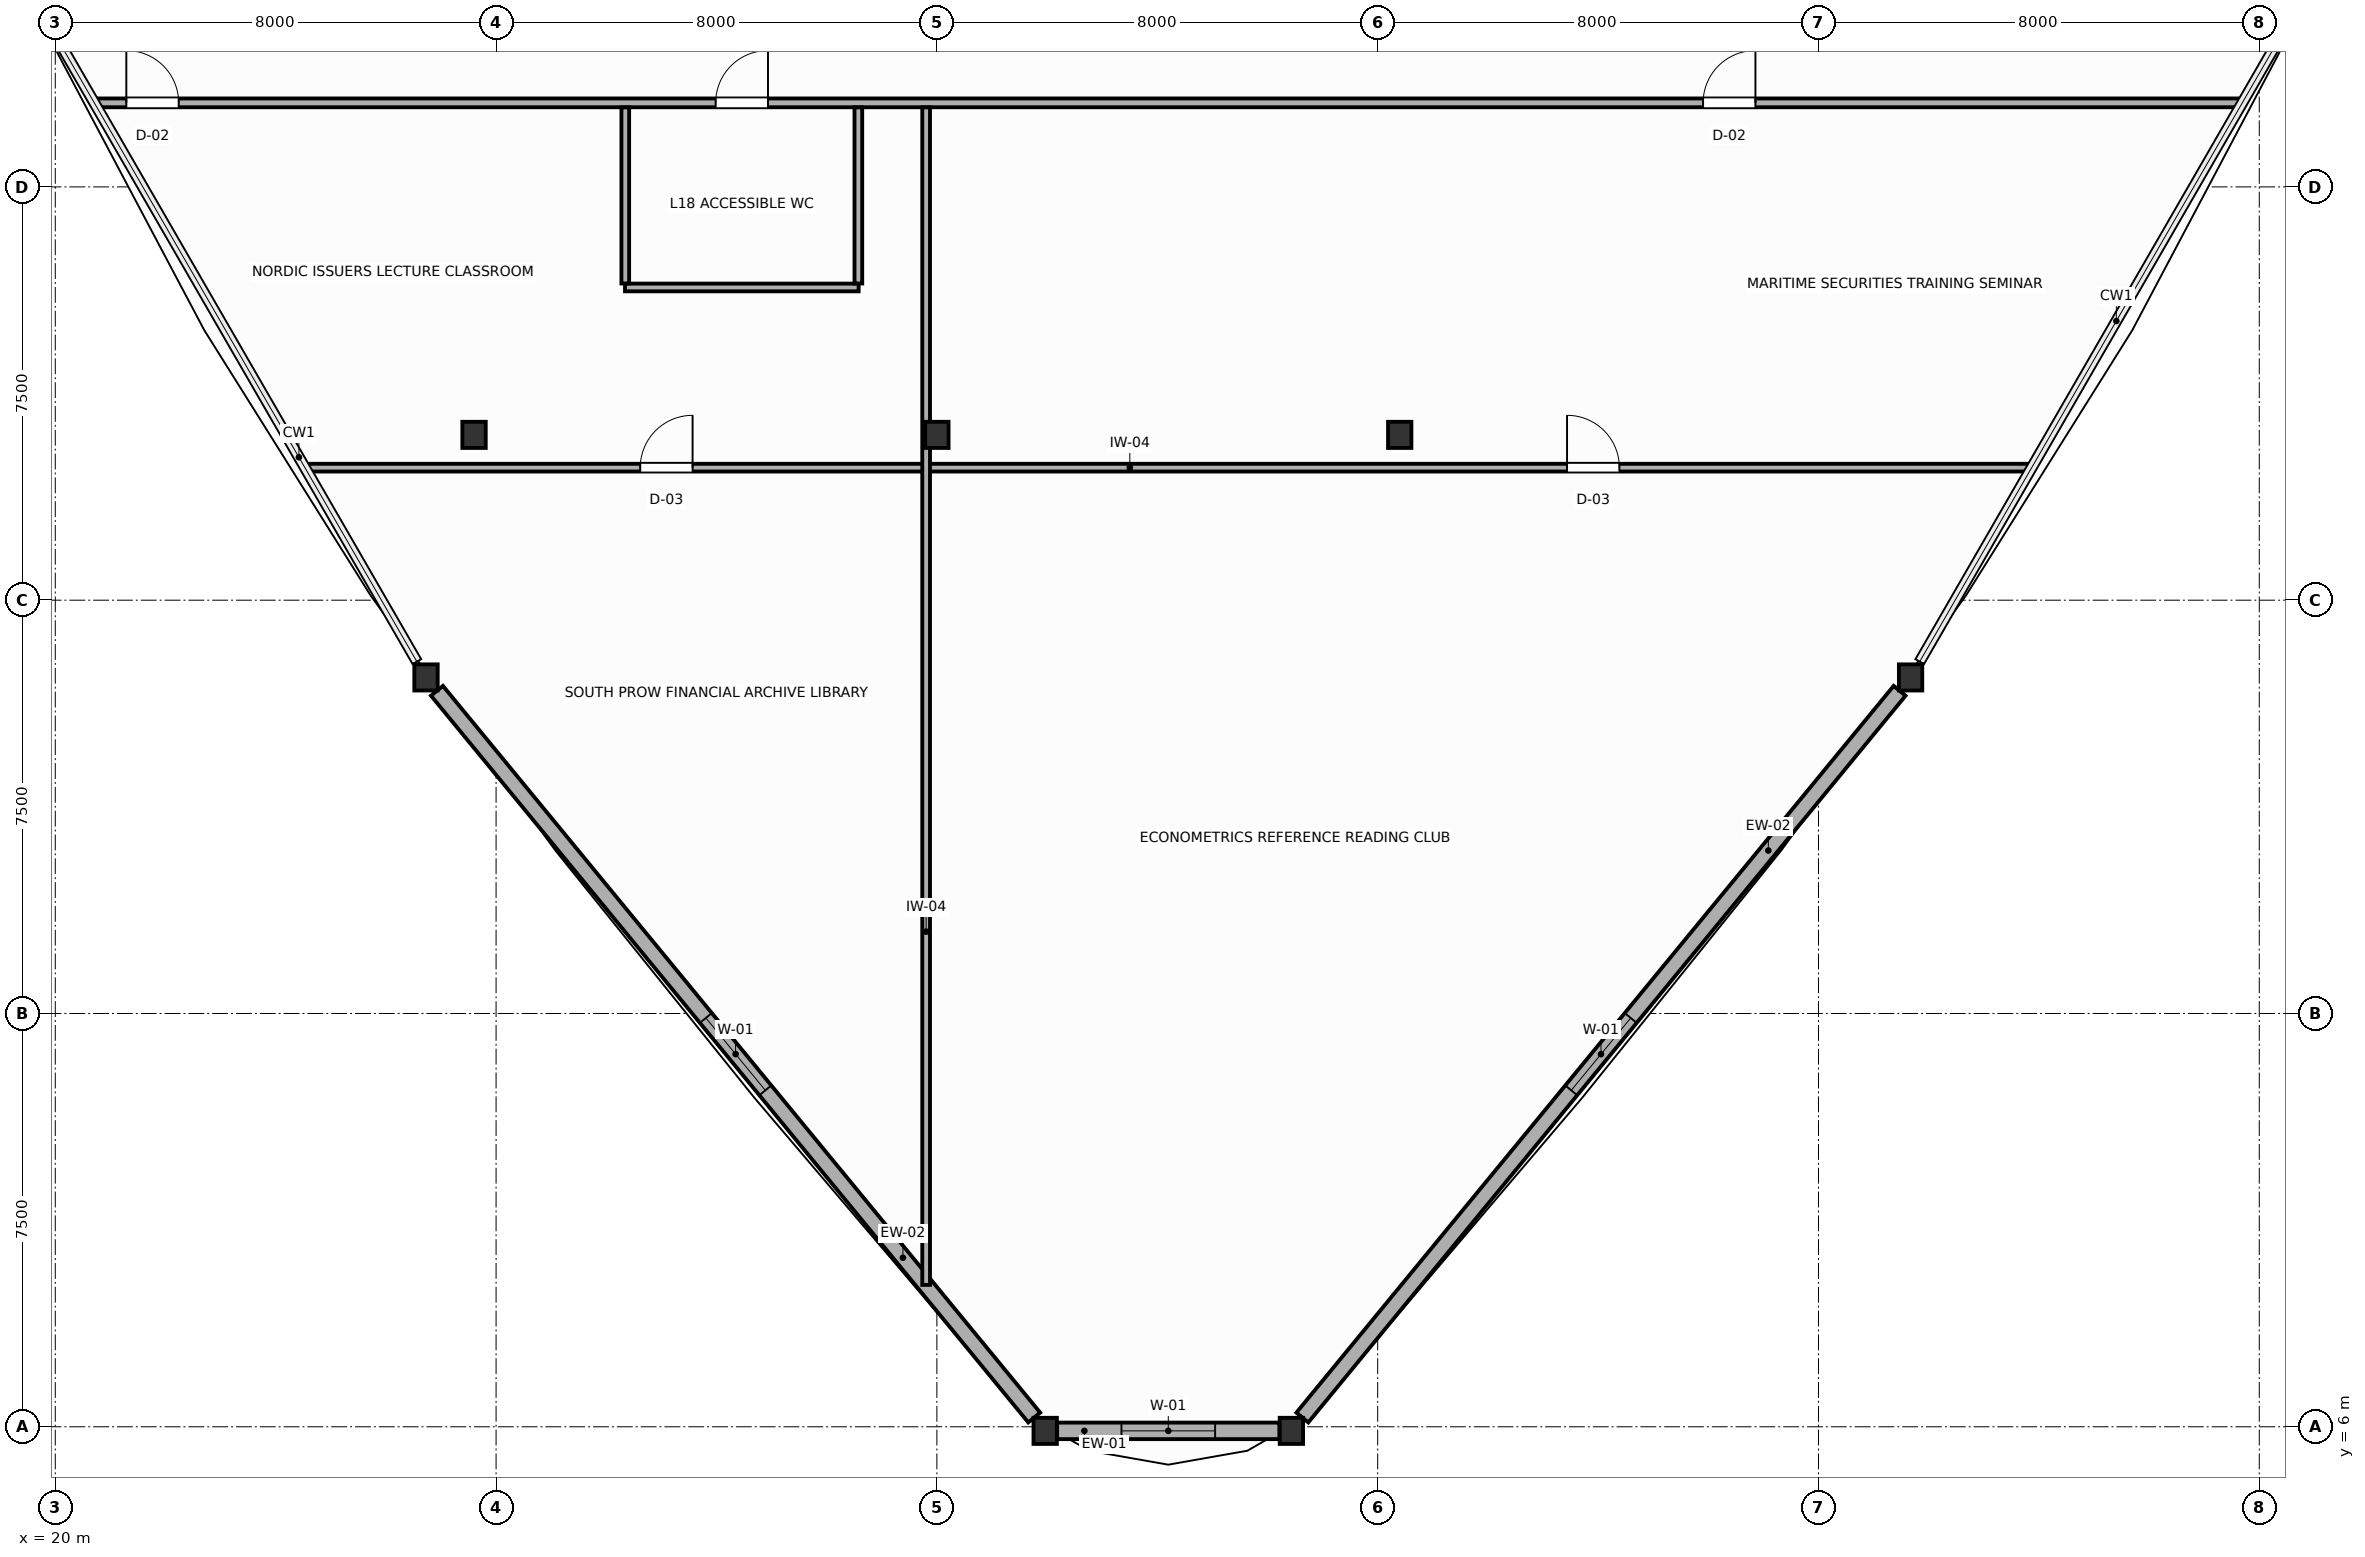
"""IFC4 building model, lengths in metres.
Left out: names, types, materials, properties, quantities, classifications, styles, units other than length and angle.
Written with IfcOpenShell. Run it as: python <this file> out.ifc"""

import sys

from ifc_helpers import new_model, si_unit, direction, frame, frame_2d, origin, origin_2d, place, context, subcontext, project, spatial, rectangle, i_section, extrude, source, transform, mapped, element, fill, save


model = new_model("IFC4")
c1 = context("Model", 3, precision=1e-05, world=origin(), true_north=direction((0.0, 1.0)))
c2 = subcontext(c1, "Body", "Model", "MODEL_VIEW")
j1 = project(units=[si_unit("LENGTHUNIT", "METRE"), si_unit("PLANEANGLEUNIT", "RADIAN")], contexts=[c1])
p1 = place(None, origin())
s1 = spatial("IfcSite", under=j1, at=p1, CompositionType="ELEMENT")
p2 = place(p1, origin())
s2 = spatial("IfcBuilding", under=s1, at=p2, CompositionType="ELEMENT")
p3 = place(p2, frame((0.0, 0.0, 75.6)))
s3 = spatial("IfcBuildingStorey", under=s2, at=p3, CompositionType="ELEMENT", Elevation=75.6)
m1 = source(origin(), c2, "Body", "SweptSolid", [
    extrude(i_section(OverallWidth=0.424, OverallDepth=0.474, WebThickness=0.045, FlangeThickness=0.072, FilletRadius=0.015, at=origin_2d()), origin(), (0.0, 0.0, 1.0), 3.9),
])
for number, where, z_axis, x_axis in (
    (1, (27.6, 24.0, 0.0), (0.0, 0.0, 1.0), (1.0, 0.0, 0.0)),
    (2, (44.4, 24.0, 0.0), (0.0, 0.0, 1.0), (1.0, 0.0, 0.0)),
    (3, (36.0, 24.0, 0.0), (0.0, 0.0, 1.0), (1.0, 0.0, 0.0)),
    (4, (26.729, 19.598, 0.0), (0.0, 0.0, 1.0), (1.0, 0.0, 0.0)),
    (5, (37.966, 5.926, 0.0), (0.0, 0.0, 1.0), (1.0, 0.0, 0.0)),
    (6, (42.434, 5.926, 0.0), (0.0, 0.0, 1.0), (1.0, 0.0, 0.0)),
    (7, (53.672, 19.598, 0.0), (0.0, 0.0, 1.0), (1.0, 0.0, 0.0)),
):
    element("IfcColumn", number, at=place(p3, frame(where, z_axis=z_axis, x_axis=x_axis)), inside=s3, PredefinedType="COLUMN", context=c2, shape_type="MappedRepresentation", body=[
        mapped(m1, transform((0.0, 0.0, 0.0), scale=1.0)),
    ])
p4 = place(p3, frame((26.927, 19.356, 0.0), z_axis=(0.0, 0.0, 1.0), x_axis=(0.634956540438, -0.772547857259, 0.0)))
e8 = element("IfcWall", 8, at=p4, inside=s3, PredefinedType="SOLIDWALL", context=c2, shape_type="SweptSolid", body=[
    extrude(rectangle(XDim=17.071, YDim=0.28, at=frame_2d((8.536, 0.0))), origin(), (0.0, 0.0, 1.0), 3.23),
])
p5 = place(p4, frame((7.686, 0.0, 0.75)))
e9 = element("IfcOpeningElement", 9, at=p5, cuts=e8, PredefinedType="OPENING", context=c2, shape_type="SweptSolid", body=[
    extrude(rectangle(XDim=1.7, YDim=1.75, at=frame_2d((0.85, 0.875))), frame((0.0, 0.15, 0.0), z_axis=(0.0, -1.0, 0.0), x_axis=(1.0, 0.0, 0.0)), (0.0, 0.0, 1.0), 0.3),
])
p6 = place(p3, frame((38.183, 5.926, 0.0), z_axis=(0.0, 0.0, 1.0), x_axis=(1.0, 0.0, 0.0)))
e10 = element("IfcWall", 10, at=p6, inside=s3, PredefinedType="SOLIDWALL", context=c2, shape_type="SweptSolid", body=[
    extrude(rectangle(XDim=4.034, YDim=0.3, at=frame_2d((2.017, 0.0))), origin(), (0.0, 0.0, 1.0), 3.23),
])
p7 = place(p6, frame((1.167, 0.0, 0.75)))
e11 = element("IfcOpeningElement", 11, at=p7, cuts=e10, PredefinedType="OPENING", context=c2, shape_type="SweptSolid", body=[
    extrude(rectangle(XDim=1.7, YDim=1.75, at=frame_2d((0.85, 0.875))), frame((0.0, 0.16, 0.0), z_axis=(0.0, -1.0, 0.0), x_axis=(1.0, 0.0, 0.0)), (0.0, 0.0, 1.0), 0.32),
])
p8 = place(p3, frame((42.633, 6.168, 0.0), z_axis=(0.0, 0.0, 1.0), x_axis=(0.634956540438, 0.772547857259, 0.0)))
e12 = element("IfcWall", 12, at=p8, inside=s3, PredefinedType="SOLIDWALL", context=c2, shape_type="SweptSolid", body=[
    extrude(rectangle(XDim=17.071, YDim=0.28, at=frame_2d((8.536, 0.0))), origin(), (0.0, 0.0, 1.0), 3.23),
])
p9 = place(p8, frame((7.686, 0.0, 0.75)))
e13 = element("IfcOpeningElement", 13, at=p9, cuts=e12, PredefinedType="OPENING", context=c2, shape_type="SweptSolid", body=[
    extrude(rectangle(XDim=1.7, YDim=1.75, at=frame_2d((0.85, 0.875))), frame((0.0, 0.15, 0.0), z_axis=(0.0, -1.0, 0.0), x_axis=(1.0, 0.0, 0.0)), (0.0, 0.0, 1.0), 0.3),
])
p10 = place(p3, frame((20.729, 30.025, 0.0), z_axis=(0.0, 0.0, 1.0), x_axis=(1.0, 0.0, 0.0)))
e14 = element("IfcWall", 14, at=p10, inside=s3, PredefinedType="PARTITIONING", context=c2, shape_type="SweptSolid", body=[
    extrude(rectangle(XDim=38.943, YDim=0.16, at=frame_2d((19.472, 0.0))), origin(), (0.0, 0.0, 1.0), 3.68),
])
p11 = place(p10, frame((11.257, 0.0, 0.0)))
e15 = element("IfcOpeningElement", 15, at=p11, cuts=e14, PredefinedType="OPENING", context=c2, shape_type="SweptSolid", body=[
    extrude(rectangle(XDim=0.95, YDim=2.05, at=frame_2d((0.475, 1.025))), frame((0.0, 0.09, 0.0), z_axis=(0.0, -1.0, 0.0), x_axis=(1.0, 0.0, 0.0)), (0.0, 0.0, 1.0), 0.18),
])
p12 = place(p10, frame((0.561, 0.0, 0.0)))
e16 = element("IfcOpeningElement", 16, at=p12, cuts=e14, PredefinedType="OPENING", context=c2, shape_type="SweptSolid", body=[
    extrude(rectangle(XDim=0.95, YDim=2.05, at=frame_2d((0.475, 1.025))), frame((0.0, 0.09, 0.0), z_axis=(0.0, -1.0, 0.0), x_axis=(1.0, 0.0, 0.0)), (0.0, 0.0, 1.0), 0.18),
])
p13 = place(p10, frame((29.177, 0.0, 0.0)))
e17 = element("IfcOpeningElement", 17, at=p13, cuts=e14, PredefinedType="OPENING", context=c2, shape_type="SweptSolid", body=[
    extrude(rectangle(XDim=0.95, YDim=2.05, at=frame_2d((0.475, 1.025))), frame((0.0, 0.09, 0.0), z_axis=(0.0, -1.0, 0.0), x_axis=(1.0, 0.0, 0.0)), (0.0, 0.0, 1.0), 0.18),
])
p14 = place(p3, frame((24.551, 23.405, 0.0), z_axis=(0.0, 0.0, 1.0), x_axis=(1.0, 0.0, 0.0)))
e18 = element("IfcWall", 18, at=p14, inside=s3, PredefinedType="PARTITIONING", context=c2, shape_type="SweptSolid", body=[
    extrude(rectangle(XDim=31.299, YDim=0.14, at=frame_2d((15.649, 0.0))), origin(), (0.0, 0.0, 1.0), 3.68),
])
p15 = place(p14, frame((6.066, 0.0, 0.0)))
e19 = element("IfcOpeningElement", 19, at=p15, cuts=e18, PredefinedType="OPENING", context=c2, shape_type="SweptSolid", body=[
    extrude(rectangle(XDim=0.95, YDim=2.05, at=frame_2d((0.475, 1.025))), frame((0.0, 0.08, 0.0), z_axis=(0.0, -1.0, 0.0), x_axis=(1.0, 0.0, 0.0)), (0.0, 0.0, 1.0), 0.16),
])
p16 = place(p14, frame((22.886, 0.0, 0.0)))
e20 = element("IfcOpeningElement", 20, at=p16, cuts=e18, PredefinedType="OPENING", context=c2, shape_type="SweptSolid", body=[
    extrude(rectangle(XDim=0.95, YDim=2.05, at=frame_2d((0.475, 1.025))), frame((0.0, 0.08, 0.0), z_axis=(0.0, -1.0, 0.0), x_axis=(1.0, 0.0, 0.0)), (0.0, 0.0, 1.0), 0.16),
])
p17 = place(p3, frame((35.805, 8.575, 0.0), z_axis=(0.0, 0.0, 1.0), x_axis=(0.0, 1.0, 0.0)))
e21 = element("IfcWall", 21, at=p17, inside=s3, PredefinedType="PARTITIONING", context=c2, shape_type="SweptSolid", body=[
    extrude(rectangle(XDim=21.368, YDim=0.14, at=frame_2d((10.684, 0.0))), origin(), (0.0, 0.0, 1.0), 3.18),
])
p18 = place(p3, frame((30.34, 26.675, 0.0), z_axis=(0.0, 0.0, 1.0), x_axis=(1.0, 0.0, 0.0)))
e22 = element("IfcWall", 22, at=p18, inside=s3, PredefinedType="PARTITIONING", context=c2, shape_type="SweptSolid", body=[
    extrude(rectangle(XDim=4.24, YDim=0.14, at=frame_2d((2.12, 0.0))), origin(), (0.0, 0.0, 1.0), 3.68),
])
for number, where, z_axis, x_axis in (
    (23, (34.575, 26.747, 0.0), (0.0, 0.0, 1.0), (0.0, 1.0, 0.0)),
    (24, (30.345, 26.747, 0.0), (0.0, 0.0, 1.0), (0.0, 1.0, 0.0)),
):
    element("IfcWall", number, at=place(p3, frame(where, z_axis=z_axis, x_axis=x_axis)), inside=s3, PredefinedType="PARTITIONING", context=c2, shape_type="SweptSolid", body=[
        extrude(rectangle(XDim=3.196, YDim=0.14, at=frame_2d((1.598, 0.0))), origin(), (0.0, 0.0, 1.0), 3.68),
    ])
p19 = place(p5, origin())
e25 = element("IfcWindow", 25, at=p19, inside=s3, PartitioningType="SINGLE_PANEL", PredefinedType="WINDOW", context=c2, shape_type="SweptSolid", body=[
    extrude(rectangle(XDim=1.7, YDim=1.75, at=frame_2d((0.85, 0.875))), frame((0.0, 0.03, 0.0), z_axis=(0.0, -1.0, 0.0), x_axis=(1.0, 0.0, 0.0)), (0.0, 0.0, 1.0), 0.06),
])
fill(e9, e25)
p20 = place(p7, origin())
e26 = element("IfcWindow", 26, at=p20, inside=s3, PartitioningType="SINGLE_PANEL", PredefinedType="WINDOW", context=c2, shape_type="SweptSolid", body=[
    extrude(rectangle(XDim=1.7, YDim=1.75, at=frame_2d((0.85, 0.875))), frame((0.0, 0.03, 0.0), z_axis=(0.0, -1.0, 0.0), x_axis=(1.0, 0.0, 0.0)), (0.0, 0.0, 1.0), 0.06),
])
fill(e11, e26)
p21 = place(p9, origin())
e27 = element("IfcWindow", 27, at=p21, inside=s3, PartitioningType="SINGLE_PANEL", PredefinedType="WINDOW", context=c2, shape_type="SweptSolid", body=[
    extrude(rectangle(XDim=1.7, YDim=1.75, at=frame_2d((0.85, 0.875))), frame((0.0, 0.03, 0.0), z_axis=(0.0, -1.0, 0.0), x_axis=(1.0, 0.0, 0.0)), (0.0, 0.0, 1.0), 0.06),
])
fill(e13, e27)
p22 = place(p11, origin())
e28 = element("IfcDoor", 28, at=p22, inside=s3, OperationType="SINGLE_SWING_RIGHT", PredefinedType="DOOR", context=c2, shape_type="SweptSolid", body=[
    extrude(rectangle(XDim=0.95, YDim=2.05, at=frame_2d((0.475, 1.025))), frame((0.0, 0.025, 0.0), z_axis=(0.0, -1.0, 0.0), x_axis=(1.0, 0.0, 0.0)), (0.0, 0.0, 1.0), 0.05),
])
fill(e15, e28)
p23 = place(p12, origin())
e29 = element("IfcDoor", 29, at=p23, inside=s3, OperationType="SINGLE_SWING_LEFT", PredefinedType="DOOR", context=c2, shape_type="SweptSolid", body=[
    extrude(rectangle(XDim=0.95, YDim=2.05, at=frame_2d((0.475, 1.025))), frame((0.0, 0.025, 0.0), z_axis=(0.0, -1.0, 0.0), x_axis=(1.0, 0.0, 0.0)), (0.0, 0.0, 1.0), 0.05),
])
fill(e16, e29)
p24 = place(p13, origin())
e30 = element("IfcDoor", 30, at=p24, inside=s3, OperationType="SINGLE_SWING_RIGHT", PredefinedType="DOOR", context=c2, shape_type="SweptSolid", body=[
    extrude(rectangle(XDim=0.95, YDim=2.05, at=frame_2d((0.475, 1.025))), frame((0.0, 0.025, 0.0), z_axis=(0.0, -1.0, 0.0), x_axis=(1.0, 0.0, 0.0)), (0.0, 0.0, 1.0), 0.05),
])
fill(e17, e30)
p25 = place(p15, origin())
e31 = element("IfcDoor", 31, at=p25, inside=s3, OperationType="SINGLE_SWING_RIGHT", PredefinedType="DOOR", context=c2, shape_type="SweptSolid", body=[
    extrude(rectangle(XDim=0.95, YDim=2.05, at=frame_2d((0.475, 1.025))), frame((0.0, 0.025, 0.0), z_axis=(0.0, -1.0, 0.0), x_axis=(1.0, 0.0, 0.0)), (0.0, 0.0, 1.0), 0.05),
])
fill(e19, e31)
p26 = place(p16, origin())
e32 = element("IfcDoor", 32, at=p26, inside=s3, OperationType="SINGLE_SWING_LEFT", PredefinedType="DOOR", context=c2, shape_type="SweptSolid", body=[
    extrude(rectangle(XDim=0.95, YDim=2.05, at=frame_2d((0.475, 1.025))), frame((0.0, 0.025, 0.0), z_axis=(0.0, -1.0, 0.0), x_axis=(1.0, 0.0, 0.0)), (0.0, 0.0, 1.0), 0.05),
])
fill(e20, e32)
save(model, sys.argv[1])
